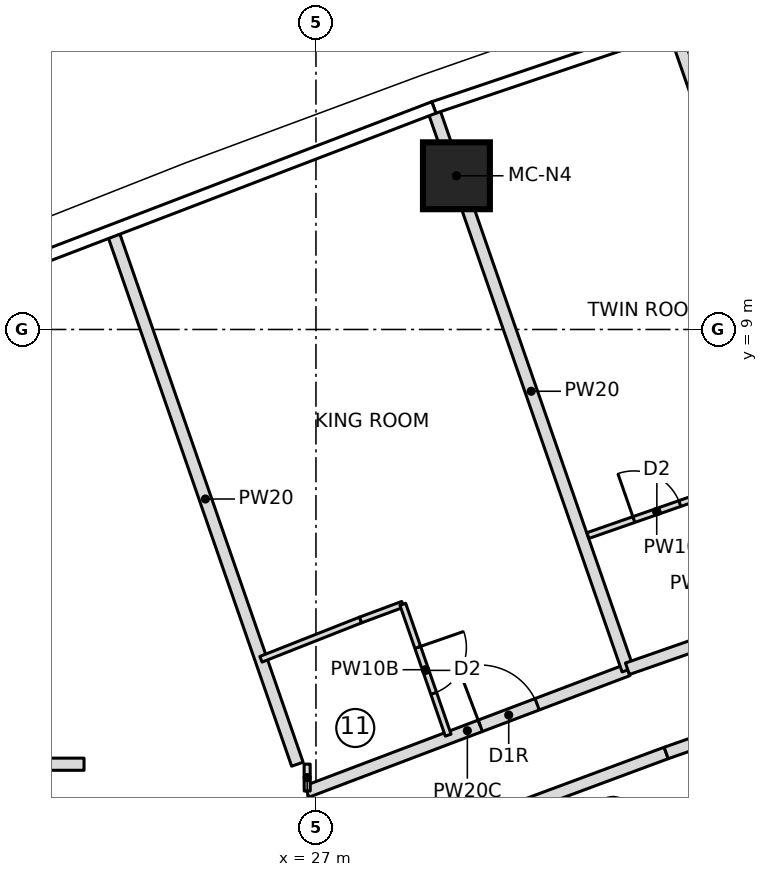
"""IFC4 building model, lengths in metres.
Left out: names, types, materials, properties, quantities, classifications, styles, units other than length and angle.
Written with IfcOpenShell. Run it as: python <this file> out.ifc"""

import sys

from ifc_helpers import new_model, si_unit, direction, frame, frame_2d, origin, origin_2d, place, context, subcontext, project, spatial, rectangle, extrude, element, fill, save


model = new_model("IFC4")
c1 = context("Model", 3, precision=1e-05, world=origin(), true_north=direction((0.0, 1.0)))
c2 = subcontext(c1, "Body", "Model", "MODEL_VIEW")
j1 = project(units=[si_unit("LENGTHUNIT", "METRE"), si_unit("PLANEANGLEUNIT", "RADIAN")], contexts=[c1])
p1 = place(None, origin())
s1 = spatial("IfcSite", under=j1, at=p1, CompositionType="ELEMENT")
p2 = place(p1, origin())
s2 = spatial("IfcBuilding", under=s1, at=p2, CompositionType="ELEMENT")
p3 = place(p2, frame((0.0, 0.0, 285.65)))
s3 = spatial("IfcBuildingStorey", under=s2, at=p3, CompositionType="ELEMENT", Elevation=285.65)
p4 = place(p3, frame((29.31, 11.528, 0.0), z_axis=(0.0, 0.0, 1.0), x_axis=(1.0, 0.0, 0.0)))
e1 = element("IfcColumn", 1, at=p4, inside=s3, PredefinedType="COLUMN", context=c2, shape_type="SweptSolid", body=[
    extrude(rectangle(XDim=1.1, YDim=1.1, at=origin_2d()), origin(), (0.0, 0.0, 1.0), 3.55),
])
p5 = place(p3, frame((7.287, 1.85, 0.0), z_axis=(0.0, 0.0, 1.0), x_axis=(1.0, 0.0, 0.0)))
e2 = element("IfcWall", 2, at=p5, inside=s3, PredefinedType="PARTITIONING", context=c2, shape_type="SweptSolid", body=[
    extrude(rectangle(XDim=15.899, YDim=0.2, at=frame_2d((7.949, 0.0))), origin(), (0.0, 0.0, 1.0), 3.25),
])
p6 = place(p5, frame((7.624, 0.0, 0.0)))
e3 = element("IfcOpeningElement", 3, at=p6, cuts=e2, PredefinedType="OPENING", context=c2, shape_type="SweptSolid", body=[
    extrude(rectangle(XDim=1.0, YDim=2.1, at=frame_2d((0.5, 1.05))), frame((0.0, 0.11, 0.0), z_axis=(0.0, -1.0, 0.0), x_axis=(1.0, 0.0, 0.0)), (0.0, 0.0, 1.0), 0.22),
])
p7 = place(p3, frame((26.694, 1.85, 0.0), z_axis=(0.0, 0.0, 1.0), x_axis=(-0.327714422317, 0.944776829418, 0.0)))
e4 = element("IfcWall", 4, at=p7, inside=s3, PredefinedType="PARTITIONING", context=c2, shape_type="SweptSolid", body=[
    extrude(rectangle(XDim=9.233, YDim=0.2, at=frame_2d((4.617, 0.0))), origin(), (0.0, 0.0, 1.0), 3.25),
])
p8 = place(p3, frame((26.85, 1.401, 0.0), z_axis=(0.0, 0.0, 1.0), x_axis=(0.935181367748, 0.354169181912, 0.0)))
e5 = element("IfcWall", 5, at=p8, inside=s3, PredefinedType="PARTITIONING", context=c2, shape_type="SweptSolid", body=[
    extrude(rectangle(XDim=5.645, YDim=0.2, at=frame_2d((2.823, 0.0))), origin(), (0.0, 0.0, 1.0), 3.25),
])
p9 = place(p8, frame((3.05, 0.0, 0.0)))
e6 = element("IfcOpeningElement", 6, at=p9, cuts=e5, PredefinedType="OPENING", context=c2, shape_type="SweptSolid", body=[
    extrude(rectangle(XDim=1.0, YDim=2.1, at=frame_2d((0.5, 1.05))), frame((0.0, 0.11, 0.0), z_axis=(0.0, -1.0, 0.0), x_axis=(1.0, 0.0, 0.0)), (0.0, 0.0, 1.0), 0.22),
])
p10 = place(p3, frame((26.096, 3.576, 0.0), z_axis=(0.0, 0.0, 1.0), x_axis=(0.930254925629, 0.366913850028, 0.0)))
e7 = element("IfcWall", 7, at=p10, inside=s3, PredefinedType="PARTITIONING", context=c2, shape_type="SweptSolid", body=[
    extrude(rectangle(XDim=1.76, YDim=0.1, at=frame_2d((0.88, 0.0))), origin(), (0.0, 0.0, 1.0), 3.25),
])
p11 = place(p3, frame((27.733, 4.222, 0.0), z_axis=(0.0, 0.0, 1.0), x_axis=(0.937514267289, 0.347946833049, 0.0)))
e8 = element("IfcWall", 8, at=p11, inside=s3, PredefinedType="PARTITIONING", context=c2, shape_type="SweptSolid", body=[
    extrude(rectangle(XDim=0.742, YDim=0.1, at=frame_2d((0.371, 0.0))), origin(), (0.0, 0.0, 1.0), 3.25),
])
p12 = place(p3, frame((28.428, 4.48, 0.0), z_axis=(0.0, 0.0, 1.0), x_axis=(0.327718024288, -0.944775579996, 0.0)))
e9 = element("IfcWall", 9, at=p12, inside=s3, PredefinedType="PARTITIONING", context=c2, shape_type="SweptSolid", body=[
    extrude(rectangle(XDim=2.277, YDim=0.1, at=frame_2d((1.139, 0.0))), origin(), (0.0, 0.0, 1.0), 3.25),
])
p13 = place(p12, frame((0.75, 0.0, 0.0)))
e10 = element("IfcOpeningElement", 10, at=p13, cuts=e9, PredefinedType="OPENING", context=c2, shape_type="SweptSolid", body=[
    extrude(rectangle(XDim=0.8, YDim=2.1, at=frame_2d((0.4, 1.05))), frame((0.0, 0.06, 0.0), z_axis=(0.0, -1.0, 0.0), x_axis=(1.0, 0.0, 0.0)), (0.0, 0.0, 1.0), 0.12),
])
p14 = place(p3, frame((32.129, 3.401, 0.0), z_axis=(0.0, 0.0, 1.0), x_axis=(-0.327724115377, 0.944773467134, 0.0)))
e11 = element("IfcWall", 11, at=p14, inside=s3, PredefinedType="PARTITIONING", context=c2, shape_type="SweptSolid", body=[
    extrude(rectangle(XDim=9.702, YDim=0.2, at=frame_2d((4.851, 0.0))), origin(), (0.0, 0.0, 1.0), 3.25),
])
p15 = place(p3, frame((36.064, 4.794, 0.0), z_axis=(0.0, 0.0, 1.0), x_axis=(-0.944236129554, -0.329269086986, 0.0)))
e12 = element("IfcWall", 12, at=p15, inside=s3, PredefinedType="PARTITIONING", context=c2, shape_type="SweptSolid", body=[
    extrude(rectangle(XDim=4.174, YDim=0.2, at=frame_2d((2.087, 0.0))), origin(), (0.0, 0.0, 1.0), 3.25),
])
p16 = place(p15, frame((0.35, 0.0, 0.0)))
e13 = element("IfcOpeningElement", 13, at=p16, cuts=e12, PredefinedType="OPENING", context=c2, shape_type="SweptSolid", body=[
    extrude(rectangle(XDim=1.0, YDim=2.1, at=frame_2d((0.5, 1.05))), frame((0.0, 0.11, 0.0), z_axis=(0.0, -1.0, 0.0), x_axis=(1.0, 0.0, 0.0)), (0.0, 0.0, 1.0), 0.22),
])
p17 = place(p3, frame((31.473, 5.611, 0.0), z_axis=(0.0, 0.0, 1.0), x_axis=(0.944305532659, 0.329069994059, 0.0)))
e14 = element("IfcWall", 14, at=p17, inside=s3, PredefinedType="PARTITIONING", context=c2, shape_type="SweptSolid", body=[
    extrude(rectangle(XDim=2.396, YDim=0.1, at=frame_2d((1.198, 0.0))), origin(), (0.0, 0.0, 1.0), 3.25),
])
p18 = place(p17, frame((0.8, 0.0, 0.0)))
e15 = element("IfcOpeningElement", 15, at=p18, cuts=e14, PredefinedType="OPENING", context=c2, shape_type="SweptSolid", body=[
    extrude(rectangle(XDim=0.8, YDim=2.1, at=frame_2d((0.4, 1.05))), frame((0.0, 0.06, 0.0), z_axis=(0.0, -1.0, 0.0), x_axis=(1.0, 0.0, 0.0)), (0.0, 0.0, 1.0), 0.12),
])
p19 = place(p3, frame((36.071, 4.775, 0.0), z_axis=(0.0, 0.0, 1.0), x_axis=(-0.327725028322, 0.94477315045, 0.0)))
e16 = element("IfcWall", 16, at=p19, inside=s3, PredefinedType="PARTITIONING", context=c2, shape_type="SweptSolid", body=[
    extrude(rectangle(XDim=9.702, YDim=0.2, at=frame_2d((4.851, 0.0))), origin(), (0.0, 0.0, 1.0), 3.25),
])
p20 = place(p3, frame((30.385, 1.153, 0.0), z_axis=(0.0, 0.0, 1.0), x_axis=(0.937461225735, 0.348089715797, 0.0)))
e17 = element("IfcWall", 17, at=p20, inside=s3, PredefinedType="PARTITIONING", context=c2, shape_type="SweptSolid", body=[
    extrude(rectangle(XDim=2.533, YDim=0.2, at=frame_2d((1.266, 0.0))), origin(), (0.0, 0.0, 1.0), 3.25),
])
p21 = place(p3, frame((32.76, 2.035, 0.0), z_axis=(0.0, 0.0, 1.0), x_axis=(0.944322693955, 0.329020743543, 0.0)))
e18 = element("IfcWall", 18, at=p21, inside=s3, PredefinedType="PARTITIONING", context=c2, shape_type="SweptSolid", body=[
    extrude(rectangle(XDim=0.663, YDim=0.2, at=frame_2d((0.331, 0.0))), origin(), (0.0, 0.0, 1.0), 3.25),
])
p22 = place(p3, frame((26.856, 1.409, 0.0), z_axis=(0.0, 0.0, 1.0), x_axis=(-0.003863105832, 0.999992538179, 0.0)))
e19 = element("IfcWall", 19, at=p22, inside=s3, PredefinedType="PARTITIONING", context=c2, shape_type="SweptSolid", body=[
    extrude(rectangle(XDim=0.442, YDim=0.1, at=frame_2d((0.221, 0.0))), origin(), (0.0, 0.0, 1.0), 3.25),
])
p23 = place(p13, origin())
e20 = element("IfcDoor", 20, at=p23, inside=s3, OperationType="SINGLE_SWING_LEFT", PredefinedType="DOOR", context=c2, shape_type="SweptSolid", body=[
    extrude(rectangle(XDim=0.8, YDim=2.1, at=frame_2d((0.4, 1.05))), frame((0.0, 0.025, 0.0), z_axis=(0.0, -1.0, 0.0), x_axis=(1.0, 0.0, 0.0)), (0.0, 0.0, 1.0), 0.05),
])
fill(e10, e20)
p24 = place(p9, origin())
e21 = element("IfcDoor", 21, at=p24, inside=s3, OperationType="SINGLE_SWING_RIGHT", PredefinedType="DOOR", context=c2, shape_type="SweptSolid", body=[
    extrude(rectangle(XDim=1.0, YDim=2.1, at=frame_2d((0.5, 1.05))), frame((0.0, 0.025, 0.0), z_axis=(0.0, -1.0, 0.0), x_axis=(1.0, 0.0, 0.0)), (0.0, 0.0, 1.0), 0.05),
])
fill(e6, e21)
p25 = place(p18, origin())
e22 = element("IfcDoor", 22, at=p25, inside=s3, OperationType="SINGLE_SWING_LEFT", PredefinedType="DOOR", context=c2, shape_type="SweptSolid", body=[
    extrude(rectangle(XDim=0.8, YDim=2.1, at=frame_2d((0.4, 1.05))), frame((0.0, 0.025, 0.0), z_axis=(0.0, -1.0, 0.0), x_axis=(1.0, 0.0, 0.0)), (0.0, 0.0, 1.0), 0.05),
])
fill(e15, e22)
save(model, sys.argv[1])
